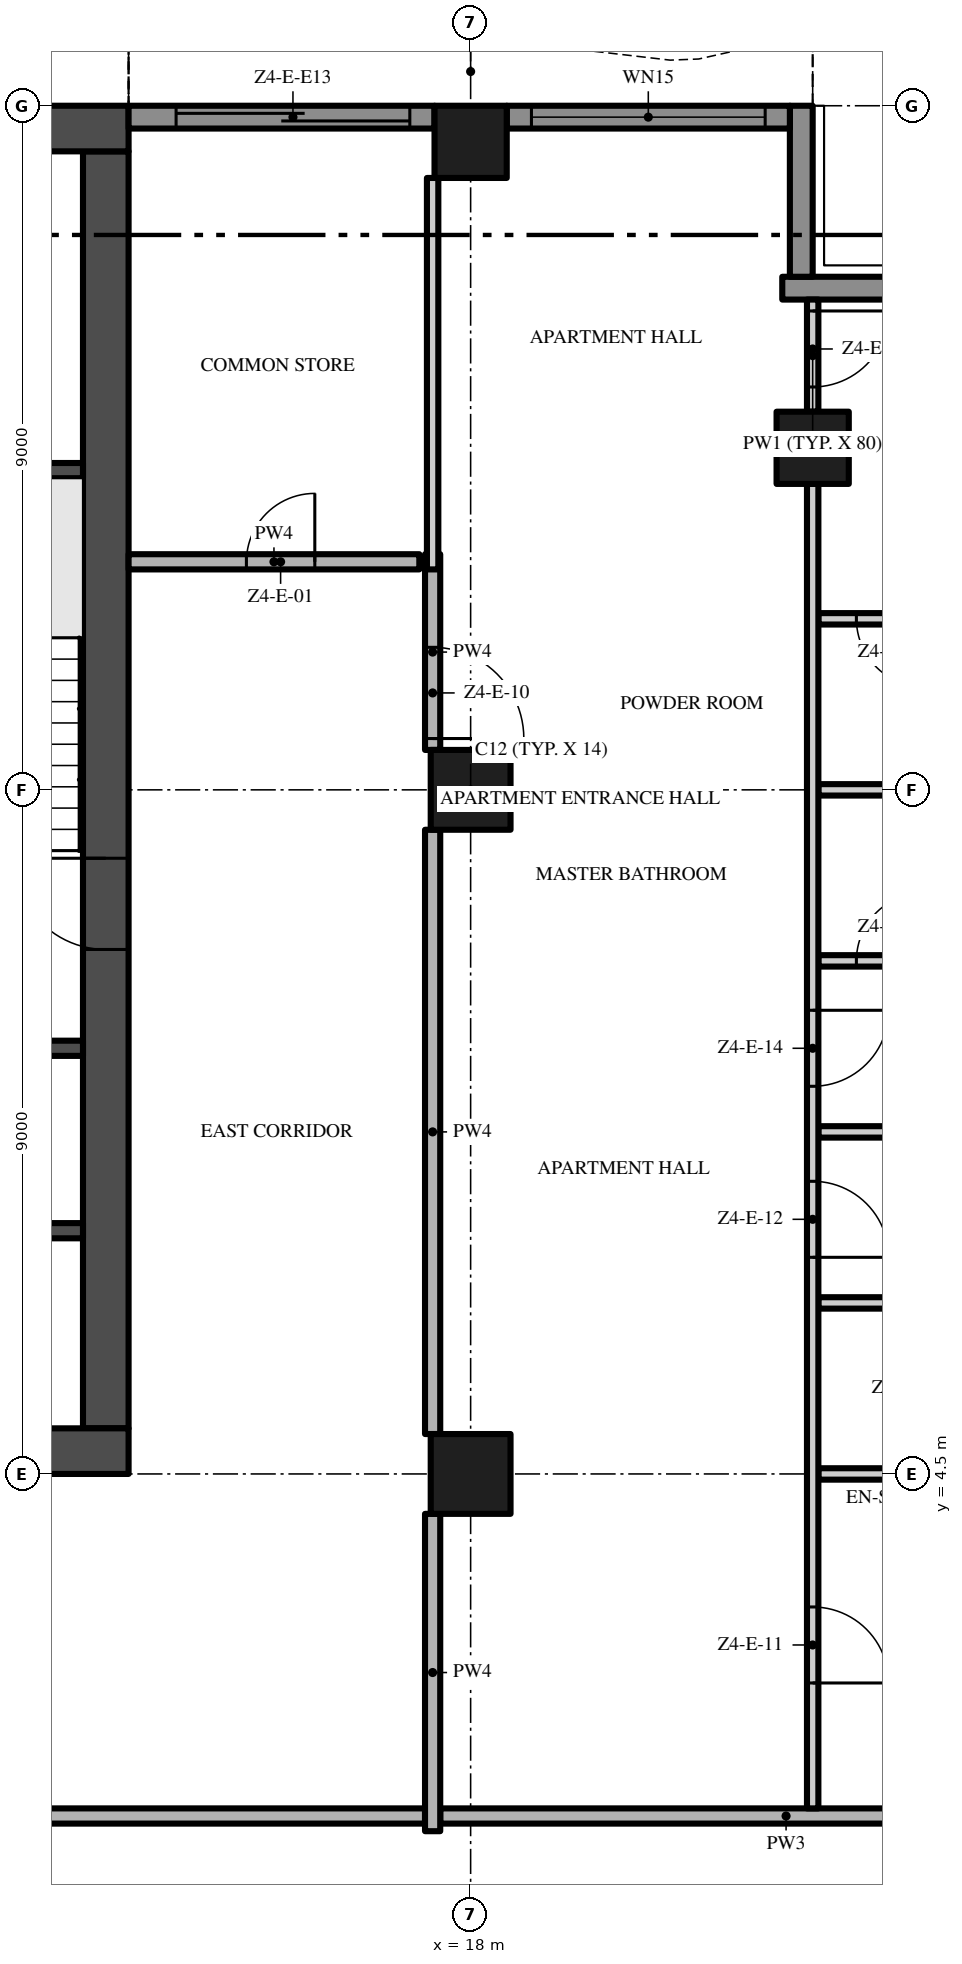
"""IFC4 building model, lengths in metres.
Left out: names, types, materials, properties, quantities, classifications, styles, units other than length and angle.
Written with IfcOpenShell. Run it as: python <this file> out.ifc"""

import sys

from ifc_helpers import new_model, si_unit, direction, frame, frame_2d, origin, origin_2d, place, context, subcontext, project, spatial, polyline, rectangle, outline, extrude, element, fill, save


model = new_model("IFC4")
c1 = context("Model", 3, precision=1e-05, world=origin(), true_north=direction((0.0, 1.0)))
c2 = subcontext(c1, "Body", "Model", "MODEL_VIEW")
j1 = project(units=[si_unit("LENGTHUNIT", "METRE"), si_unit("PLANEANGLEUNIT", "RADIAN")], contexts=[c1])
p1 = place(None, origin())
s1 = spatial("IfcSite", under=j1, at=p1, CompositionType="ELEMENT")
p2 = place(p1, origin())
s2 = spatial("IfcBuilding", under=s1, at=p2, CompositionType="ELEMENT")
p3 = place(p2, frame((0.0, 0.0, 230.0)))
s3 = spatial("IfcBuildingStorey", under=s2, at=p3, CompositionType="ELEMENT", Elevation=230.0)
p4 = place(p3, frame((-13.5, 4.8, -0.3), z_axis=(0.0, 0.0, 1.0), x_axis=(1.0, 0.0, 0.0)))
e1 = element("IfcWall", 1, at=p4, inside=s3, PredefinedType="SHEAR", context=c2, shape_type="SweptSolid", body=[
    extrude(rectangle(XDim=27.0, YDim=0.6, at=frame_2d((13.5, 0.0))), origin(), (0.0, 0.0, 1.0), 3.8),
])
p5 = place(p4, frame((12.0, 0.0, 0.3)))
e2 = element("IfcOpeningElement", 2, at=p5, cuts=e1, PredefinedType="OPENING", context=c2, shape_type="SweptSolid", body=[
    extrude(rectangle(XDim=3.0, YDim=2.4, at=frame_2d((1.5, 1.2))), frame((0.0, 0.31, 0.0), z_axis=(0.0, -1.0, 0.0), x_axis=(1.0, 0.0, 0.0)), (0.0, 0.0, 1.0), 0.62),
])
p6 = place(p4, frame((4.9, 0.0, 0.3)))
e3 = element("IfcOpeningElement", 3, at=p6, cuts=e1, PredefinedType="OPENING", context=c2, shape_type="SweptSolid", body=[
    extrude(rectangle(XDim=1.2, YDim=2.2, at=frame_2d((0.6, 1.1))), frame((0.0, 0.31, 0.0), z_axis=(0.0, -1.0, 0.0), x_axis=(1.0, 0.0, 0.0)), (0.0, 0.0, 1.0), 0.62),
])
p7 = place(p4, frame((20.75, 0.0, 0.3)))
e4 = element("IfcOpeningElement", 4, at=p7, cuts=e1, PredefinedType="OPENING", context=c2, shape_type="SweptSolid", body=[
    extrude(rectangle(XDim=1.5, YDim=2.2, at=frame_2d((0.75, 1.1))), frame((0.0, 0.31, 0.0), z_axis=(0.0, -1.0, 0.0), x_axis=(1.0, 0.0, 0.0)), (0.0, 0.0, 1.0), 0.62),
])
p8 = place(p4, frame((17.4, 0.0, 0.3)))
e5 = element("IfcOpeningElement", 5, at=p8, cuts=e1, PredefinedType="OPENING", context=c2, shape_type="SweptSolid", body=[
    extrude(rectangle(XDim=1.2, YDim=2.2, at=frame_2d((0.6, 1.1))), frame((0.0, 0.31, 0.0), z_axis=(0.0, -1.0, 0.0), x_axis=(1.0, 0.0, 0.0)), (0.0, 0.0, 1.0), 0.62),
])
p9 = place(p3, frame((13.2, 5.1, -0.3), z_axis=(0.0, 0.0, 1.0), x_axis=(0.0, 1.0, 0.0)))
e6 = element("IfcWall", 6, at=p9, inside=s3, PredefinedType="SHEAR", context=c2, shape_type="SweptSolid", body=[
    extrude(rectangle(XDim=16.8, YDim=0.6, at=frame_2d((8.4, 0.0))), origin(), (0.0, 0.0, 1.0), 3.8),
])
p10 = place(p9, frame((6.3, 0.0, 0.3)))
e7 = element("IfcOpeningElement", 7, at=p10, cuts=e6, PredefinedType="OPENING", context=c2, shape_type="SweptSolid", body=[
    extrude(rectangle(XDim=1.2, YDim=2.2, at=frame_2d((0.6, 1.1))), frame((0.0, 0.31, 0.0), z_axis=(0.0, -1.0, 0.0), x_axis=(1.0, 0.0, 0.0)), (0.0, 0.0, 1.0), 0.62),
])
p11 = place(p3, frame((13.5, 22.2, -0.3), z_axis=(0.0, 0.0, 1.0), x_axis=(-1.0, 0.0, 0.0)))
e8 = element("IfcWall", 8, at=p11, inside=s3, PredefinedType="SHEAR", context=c2, shape_type="SweptSolid", body=[
    extrude(rectangle(XDim=27.0, YDim=0.6, at=frame_2d((13.5, 0.0))), origin(), (0.0, 0.0, 1.0), 3.8),
])
p12 = place(p3, frame((18.0, 13.5, 0.0), z_axis=(0.0, 0.0, 1.0), x_axis=(1.0, 0.0, 0.0)))
e9 = element("IfcColumn", 9, at=p12, inside=s3, PredefinedType="COLUMN", context=c2, shape_type="SweptSolid", body=[
    extrude(rectangle(XDim=1.05, YDim=1.05, at=origin_2d()), origin(), (0.0, 0.0, 1.0), 3.5),
])
p13 = place(p3, frame((18.0, 22.025, 0.0), z_axis=(0.0, 0.0, 1.0), x_axis=(1.0, 0.0, 0.0)))
e10 = element("IfcColumn", 10, at=p13, inside=s3, PredefinedType="COLUMN", context=c2, shape_type="SweptSolid", body=[
    extrude(rectangle(XDim=0.95, YDim=0.95, at=origin_2d()), origin(), (0.0, 0.0, 1.0), 3.5),
])
p14 = place(p3, frame((18.0, 4.5, 0.0), z_axis=(0.0, 0.0, 1.0), x_axis=(1.0, 0.0, 0.0)))
e11 = element("IfcColumn", 11, at=p14, inside=s3, PredefinedType="COLUMN", context=c2, shape_type="SweptSolid", body=[
    extrude(rectangle(XDim=1.05, YDim=1.05, at=origin_2d()), origin(), (0.0, 0.0, 1.0), 3.5),
])
p15 = place(p3, frame((22.5, 18.0, 0.0), z_axis=(0.0, 0.0, 1.0), x_axis=(1.0, 0.0, 0.0)))
e12 = element("IfcColumn", 12, at=p15, inside=s3, PredefinedType="COLUMN", context=c2, shape_type="SweptSolid", body=[
    extrude(rectangle(XDim=0.95, YDim=0.95, at=origin_2d()), origin(), (0.0, 0.0, 1.0), 3.5),
])
p16 = place(p3, frame((22.1, 20.1, 0.0), z_axis=(0.0, 0.0, 1.0), x_axis=(1.0, 0.0, 0.0)))
e13 = element("IfcWall", 13, at=p16, inside=s3, PredefinedType="SOLIDWALL", context=c2, shape_type="SweptSolid", body=[
    extrude(rectangle(XDim=2.35, YDim=0.3, at=frame_2d((1.175, 0.0))), origin(), (0.0, 0.0, 1.0), 3.5),
])
p17 = place(p3, frame((22.35, 22.5, 0.0), z_axis=(0.0, 0.0, 1.0), x_axis=(0.0, -1.0, 0.0)))
e14 = element("IfcWall", 14, at=p17, inside=s3, PredefinedType="SOLIDWALL", context=c2, shape_type="SweptSolid", body=[
    extrude(rectangle(XDim=2.25, YDim=0.3, at=frame_2d((1.125, 0.0))), origin(), (0.0, 0.0, 1.0), 3.5),
])
p18 = place(p3, frame((18.475, 22.35, 0.0), z_axis=(0.0, 0.0, 1.0), x_axis=(1.0, 0.0, 0.0)))
e15 = element("IfcWall", 15, at=p18, inside=s3, PredefinedType="SOLIDWALL", context=c2, shape_type="SweptSolid", body=[
    extrude(rectangle(XDim=3.725, YDim=0.3, at=frame_2d((1.863, 0.0))), origin(), (0.0, 0.0, 1.0), 3.5),
])
p19 = place(p18, frame((0.325, 0.0, 0.45)))
e16 = element("IfcOpeningElement", 16, at=p19, cuts=e15, PredefinedType="OPENING", context=c2, shape_type="SweptSolid", body=[
    extrude(rectangle(XDim=3.075, YDim=2.65, at=frame_2d((1.538, 1.325))), frame((0.0, 0.16, 0.0), z_axis=(0.0, -1.0, 0.0), x_axis=(1.0, 0.0, 0.0)), (0.0, 0.0, 1.0), 0.32),
])
p20 = place(p3, frame((13.5, 22.35, 0.0), z_axis=(0.0, 0.0, 1.0), x_axis=(1.0, 0.0, 0.0)))
e17 = element("IfcWall", 17, at=p20, inside=s3, PredefinedType="SOLIDWALL", context=c2, shape_type="SweptSolid", body=[
    extrude(rectangle(XDim=4.025, YDim=0.3, at=frame_2d((2.013, 0.0))), origin(), (0.0, 0.0, 1.0), 3.5),
])
p21 = place(p20, frame((0.625, 0.0, 0.0)))
e18 = element("IfcOpeningElement", 18, at=p21, cuts=e17, PredefinedType="OPENING", context=c2, shape_type="SweptSolid", body=[
    extrude(rectangle(XDim=3.075, YDim=2.4, at=frame_2d((1.538, 1.2))), frame((0.0, 0.16, 0.0), z_axis=(0.0, -1.0, 0.0), x_axis=(1.0, 0.0, 0.0)), (0.0, 0.0, 1.0), 0.32),
])
p22 = place(p3, origin())
e19 = element("IfcWall", 19, at=p22, inside=s3, PredefinedType="USERDEFINED", context=c2, shape_type="SweptSolid", body=[
    extrude(outline(polyline([(22.5, 23.451), (21.0, 23.115), (20.625, 23.1), (19.5, 23.231), (18.0, 23.755), (16.5, 24.488), (15.0, 25.149), (13.5, 25.485), (13.445, 25.241), (14.921, 24.91), (16.395, 24.261), (17.904, 23.524), (19.444, 22.986), (20.615, 22.849), (21.033, 22.866), (22.555, 23.208), (22.5, 23.451)])), origin(), (0.0, 0.0, 1.0), 0.9),
])
for number, where, z_axis, x_axis in (
    (20, (9.65, 7.7, 0.0), (0.0, 0.0, 1.0), (1.0, 0.0, 0.0)),
    (21, (9.65, 10.1, 0.0), (0.0, 0.0, 1.0), (1.0, 0.0, 0.0)),
    (22, (9.65, 17.7, 0.0), (0.0, 0.0, 1.0), (1.0, 0.0, 0.0)),
):
    element("IfcWall", number, at=place(p3, frame(where, z_axis=z_axis, x_axis=x_axis)), inside=s3, PredefinedType="SHEAR", context=c2, shape_type="SweptSolid", body=[
        extrude(rectangle(XDim=3.25, YDim=0.2, at=frame_2d((1.625, 0.0))), origin(), (0.0, 0.0, 1.0), 3.5),
    ])
p23 = place(p3, frame((17.4, 0.0, 0.0), z_axis=(0.0, 0.0, 1.0), x_axis=(-1.0, 0.0, 0.0)))
e23 = element("IfcWall", 23, at=p23, inside=s3, PredefinedType="PARTITIONING", context=c2, shape_type="SweptSolid", body=[
    extrude(rectangle(XDim=17.3, YDim=0.2, at=frame_2d((8.65, 0.0))), origin(), (0.0, 0.0, 1.0), 3.5),
])
p24 = place(p23, frame((7.65, 0.0, 0.0)))
e24 = element("IfcOpeningElement", 24, at=p24, cuts=e23, PredefinedType="OPENING", context=c2, shape_type="SweptSolid", body=[
    extrude(rectangle(XDim=1.5, YDim=2.4, at=frame_2d((0.75, 1.2))), frame((0.0, 0.11, 0.0), z_axis=(0.0, -1.0, 0.0), x_axis=(1.0, 0.0, 0.0)), (0.0, 0.0, 1.0), 0.22),
])
p25 = place(p3, frame((17.6, 0.0, 0.0), z_axis=(0.0, 0.0, 1.0), x_axis=(1.0, 0.0, 0.0)))
e25 = element("IfcWall", 25, at=p25, inside=s3, PredefinedType="PARTITIONING", context=c2, shape_type="SweptSolid", body=[
    extrude(rectangle(XDim=9.1, YDim=0.2, at=frame_2d((4.55, 0.0))), origin(), (0.0, 0.0, 1.0), 3.5),
])
p26 = place(p3, frame((22.575, 4.5, 0.0), z_axis=(0.0, 0.0, 1.0), x_axis=(1.0, 0.0, 0.0)))
e26 = element("IfcWall", 26, at=p26, inside=s3, PredefinedType="PARTITIONING", context=c2, shape_type="SweptSolid", body=[
    extrude(rectangle(XDim=3.475, YDim=0.15, at=frame_2d((1.738, 0.0))), origin(), (0.0, 0.0, 1.0), 3.5),
])
p27 = place(p3, frame((22.575, 6.75, 0.0), z_axis=(0.0, 0.0, 1.0), x_axis=(1.0, 0.0, 0.0)))
e27 = element("IfcWall", 27, at=p27, inside=s3, PredefinedType="PARTITIONING", context=c2, shape_type="SweptSolid", body=[
    extrude(rectangle(XDim=1.875, YDim=0.15, at=frame_2d((0.938, 0.0))), origin(), (0.0, 0.0, 1.0), 3.5),
])
p28 = place(p3, frame((22.575, 9.0, 0.0), z_axis=(0.0, 0.0, 1.0), x_axis=(1.0, 0.0, 0.0)))
e28 = element("IfcWall", 28, at=p28, inside=s3, PredefinedType="PARTITIONING", context=c2, shape_type="SweptSolid", body=[
    extrude(rectangle(XDim=4.125, YDim=0.15, at=frame_2d((2.062, 0.0))), origin(), (0.0, 0.0, 1.0), 3.5),
])
p29 = place(p3, frame((22.575, 11.25, 0.0), z_axis=(0.0, 0.0, 1.0), x_axis=(1.0, 0.0, 0.0)))
e29 = element("IfcWall", 29, at=p29, inside=s3, PredefinedType="PARTITIONING", context=c2, shape_type="SweptSolid", body=[
    extrude(rectangle(XDim=1.875, YDim=0.15, at=frame_2d((0.938, 0.0))), origin(), (0.0, 0.0, 1.0), 3.5),
])
p30 = place(p29, frame((0.5, 0.0, 0.0)))
e30 = element("IfcOpeningElement", 30, at=p30, cuts=e29, PredefinedType="OPENING", context=c2, shape_type="SweptSolid", body=[
    extrude(rectangle(XDim=0.9, YDim=2.1, at=frame_2d((0.45, 1.05))), frame((0.0, 0.085, 0.0), z_axis=(0.0, -1.0, 0.0), x_axis=(1.0, 0.0, 0.0)), (0.0, 0.0, 1.0), 0.17),
])
p31 = place(p3, frame((22.575, 13.5, 0.0), z_axis=(0.0, 0.0, 1.0), x_axis=(1.0, 0.0, 0.0)))
e31 = element("IfcWall", 31, at=p31, inside=s3, PredefinedType="PARTITIONING", context=c2, shape_type="SweptSolid", body=[
    extrude(rectangle(XDim=1.875, YDim=0.15, at=frame_2d((0.938, 0.0))), origin(), (0.0, 0.0, 1.0), 3.5),
])
p32 = place(p3, frame((24.45, 15.75, 0.0), z_axis=(0.0, 0.0, 1.0), x_axis=(-1.0, 0.0, 0.0)))
e32 = element("IfcWall", 32, at=p32, inside=s3, PredefinedType="PARTITIONING", context=c2, shape_type="SweptSolid", body=[
    extrude(rectangle(XDim=1.875, YDim=0.15, at=frame_2d((0.938, 0.0))), origin(), (0.0, 0.0, 1.0), 3.5),
])
p33 = place(p32, frame((0.475, 0.0, 0.0)))
e33 = element("IfcOpeningElement", 33, at=p33, cuts=e32, PredefinedType="OPENING", context=c2, shape_type="SweptSolid", body=[
    extrude(rectangle(XDim=0.9, YDim=2.1, at=frame_2d((0.45, 1.05))), frame((0.0, 0.085, 0.0), z_axis=(0.0, -1.0, 0.0), x_axis=(1.0, 0.0, 0.0)), (0.0, 0.0, 1.0), 0.17),
])
p34 = place(p3, frame((13.5, 16.5, 0.0), z_axis=(0.0, 0.0, 1.0), x_axis=(1.0, 0.0, 0.0)))
e34 = element("IfcWall", 34, at=p34, inside=s3, PredefinedType="PARTITIONING", context=c2, shape_type="SweptSolid", body=[
    extrude(rectangle(XDim=3.825, YDim=0.2, at=frame_2d((1.913, 0.0))), origin(), (0.0, 0.0, 1.0), 3.5),
])
p35 = place(p34, frame((1.55, 0.0, 0.0)))
e35 = element("IfcOpeningElement", 35, at=p35, cuts=e34, PredefinedType="OPENING", context=c2, shape_type="SweptSolid", body=[
    extrude(rectangle(XDim=0.9, YDim=2.1, at=frame_2d((0.45, 1.05))), frame((0.0, 0.11, 0.0), z_axis=(0.0, -1.0, 0.0), x_axis=(1.0, 0.0, 0.0)), (0.0, 0.0, 1.0), 0.22),
])
p36 = place(p3, frame((17.5, -0.2, 0.0), z_axis=(0.0, 0.0, 1.0), x_axis=(0.0, 1.0, 0.0)))
e36 = element("IfcWall", 36, at=p36, inside=s3, PredefinedType="PARTITIONING", context=c2, shape_type="SweptSolid", body=[
    extrude(rectangle(XDim=4.175, YDim=0.2, at=frame_2d((2.087, 0.0))), origin(), (0.0, 0.0, 1.0), 3.5),
])
p37 = place(p3, frame((17.5, 5.025, 0.0), z_axis=(0.0, 0.0, 1.0), x_axis=(0.0, 1.0, 0.0)))
e37 = element("IfcWall", 37, at=p37, inside=s3, PredefinedType="PARTITIONING", context=c2, shape_type="SweptSolid", body=[
    extrude(rectangle(XDim=7.95, YDim=0.2, at=frame_2d((3.975, 0.0))), origin(), (0.0, 0.0, 1.0), 3.5),
])
p38 = place(p3, frame((17.5, 16.6, 0.0), z_axis=(0.0, 0.0, 1.0), x_axis=(0.0, -1.0, 0.0)))
e38 = element("IfcWall", 38, at=p38, inside=s3, PredefinedType="PARTITIONING", context=c2, shape_type="SweptSolid", body=[
    extrude(rectangle(XDim=2.575, YDim=0.2, at=frame_2d((1.288, 0.0))), origin(), (0.0, 0.0, 1.0), 3.5),
])
p39 = place(p38, frame((1.225, 0.0, 0.0)))
e39 = element("IfcOpeningElement", 39, at=p39, cuts=e38, PredefinedType="OPENING", context=c2, shape_type="SweptSolid", body=[
    extrude(rectangle(XDim=1.2, YDim=2.4, at=frame_2d((0.6, 1.2))), frame((0.0, 0.11, 0.0), z_axis=(0.0, -1.0, 0.0), x_axis=(1.0, 0.0, 0.0)), (0.0, 0.0, 1.0), 0.22),
])
p40 = place(p3, frame((17.5, 16.4, 0.0), z_axis=(0.0, 0.0, 1.0), x_axis=(0.0, 1.0, 0.0)))
e40 = element("IfcWall", 40, at=p40, inside=s3, PredefinedType="PARTITIONING", context=c2, shape_type="SweptSolid", body=[
    extrude(rectangle(XDim=5.15, YDim=0.15, at=frame_2d((2.575, 0.0))), origin(), (0.0, 0.0, 1.0), 3.5),
])
p41 = place(p3, frame((22.5, 17.525, 0.0), z_axis=(0.0, 0.0, 1.0), x_axis=(0.0, -1.0, 0.0)))
e41 = element("IfcWall", 41, at=p41, inside=s3, PredefinedType="PARTITIONING", context=c2, shape_type="SweptSolid", body=[
    extrude(rectangle(XDim=17.425, YDim=0.15, at=frame_2d((8.713, 0.0))), origin(), (0.0, 0.0, 1.0), 3.5),
])
p42 = place(p41, frame((14.775, 0.0, 0.0)))
e42 = element("IfcOpeningElement", 42, at=p42, cuts=e41, PredefinedType="OPENING", context=c2, shape_type="SweptSolid", body=[
    extrude(rectangle(XDim=1.0, YDim=2.4, at=frame_2d((0.5, 1.2))), frame((0.0, 0.085, 0.0), z_axis=(0.0, -1.0, 0.0), x_axis=(1.0, 0.0, 0.0)), (0.0, 0.0, 1.0), 0.17),
])
p43 = place(p41, frame((9.175, 0.0, 0.0)))
e43 = element("IfcOpeningElement", 43, at=p43, cuts=e41, PredefinedType="OPENING", context=c2, shape_type="SweptSolid", body=[
    extrude(rectangle(XDim=1.0, YDim=2.4, at=frame_2d((0.5, 1.2))), frame((0.0, 0.085, 0.0), z_axis=(0.0, -1.0, 0.0), x_axis=(1.0, 0.0, 0.0)), (0.0, 0.0, 1.0), 0.17),
])
p44 = place(p41, frame((6.925, 0.0, 0.0)))
e44 = element("IfcOpeningElement", 44, at=p44, cuts=e41, PredefinedType="OPENING", context=c2, shape_type="SweptSolid", body=[
    extrude(rectangle(XDim=1.0, YDim=2.4, at=frame_2d((0.5, 1.2))), frame((0.0, 0.085, 0.0), z_axis=(0.0, -1.0, 0.0), x_axis=(1.0, 0.0, 0.0)), (0.0, 0.0, 1.0), 0.17),
])
p45 = place(p3, frame((22.5, 19.95, 0.0), z_axis=(0.0, 0.0, 1.0), x_axis=(0.0, -1.0, 0.0)))
e45 = element("IfcWall", 45, at=p45, inside=s3, PredefinedType="PARTITIONING", context=c2, shape_type="SweptSolid", body=[
    extrude(rectangle(XDim=1.475, YDim=0.15, at=frame_2d((0.738, 0.0))), origin(), (0.0, 0.0, 1.0), 3.5),
])
p46 = place(p45, frame((0.15, 0.0, 0.0)))
e46 = element("IfcOpeningElement", 46, at=p46, cuts=e45, PredefinedType="OPENING", context=c2, shape_type="SweptSolid", body=[
    extrude(rectangle(XDim=1.0, YDim=2.4, at=frame_2d((0.5, 1.2))), frame((0.0, 0.085, 0.0), z_axis=(0.0, -1.0, 0.0), x_axis=(1.0, 0.0, 0.0)), (0.0, 0.0, 1.0), 0.17),
])
p47 = place(p19, origin())
e47 = element("IfcWindow", 47, at=p47, inside=s3, PartitioningType="SINGLE_PANEL", PredefinedType="WINDOW", context=c2, shape_type="SweptSolid", body=[
    extrude(rectangle(XDim=3.075, YDim=2.65, at=frame_2d((1.538, 1.325))), frame((0.0, 0.03, 0.0), z_axis=(0.0, -1.0, 0.0), x_axis=(1.0, 0.0, 0.0)), (0.0, 0.0, 1.0), 0.06),
])
fill(e16, e47)
p48 = place(p21, origin())
e48 = element("IfcDoor", 48, at=p48, inside=s3, OperationType="SINGLE_SWING_LEFT", PredefinedType="DOOR", context=c2, shape_type="SweptSolid", body=[
    extrude(rectangle(XDim=3.075, YDim=2.4, at=frame_2d((1.538, 1.2))), frame((0.0, 0.025, 0.0), z_axis=(0.0, -1.0, 0.0), x_axis=(1.0, 0.0, 0.0)), (0.0, 0.0, 1.0), 0.05),
])
fill(e18, e48)
p49 = place(p10, frame((1.2, 0.0, 0.0), z_axis=(0.0, 0.0, 1.0), x_axis=(-1.0, 0.0, 0.0)))
e49 = element("IfcDoor", 49, at=p49, inside=s3, OperationType="SINGLE_SWING_LEFT", PredefinedType="DOOR", context=c2, shape_type="SweptSolid", body=[
    extrude(rectangle(XDim=1.2, YDim=2.2, at=frame_2d((0.6, 1.1))), frame((0.0, 0.025, 0.0), z_axis=(0.0, -1.0, 0.0), x_axis=(1.0, 0.0, 0.0)), (0.0, 0.0, 1.0), 0.05),
])
fill(e7, e49)
p50 = place(p35, origin())
e50 = element("IfcDoor", 50, at=p50, inside=s3, OperationType="SINGLE_SWING_RIGHT", PredefinedType="DOOR", context=c2, shape_type="SweptSolid", body=[
    extrude(rectangle(XDim=0.9, YDim=2.1, at=frame_2d((0.45, 1.05))), frame((0.0, 0.025, 0.0), z_axis=(0.0, -1.0, 0.0), x_axis=(1.0, 0.0, 0.0)), (0.0, 0.0, 1.0), 0.05),
])
fill(e35, e50)
p51 = place(p39, origin())
e51 = element("IfcDoor", 51, at=p51, inside=s3, OperationType="SINGLE_SWING_RIGHT", PredefinedType="DOOR", context=c2, shape_type="SweptSolid", body=[
    extrude(rectangle(XDim=1.2, YDim=2.4, at=frame_2d((0.6, 1.2))), frame((0.0, 0.025, 0.0), z_axis=(0.0, -1.0, 0.0), x_axis=(1.0, 0.0, 0.0)), (0.0, 0.0, 1.0), 0.05),
])
fill(e39, e51)
p52 = place(p42, origin())
e52 = element("IfcDoor", 52, at=p52, inside=s3, OperationType="SINGLE_SWING_RIGHT", PredefinedType="DOOR", context=c2, shape_type="SweptSolid", body=[
    extrude(rectangle(XDim=1.0, YDim=2.4, at=frame_2d((0.5, 1.2))), frame((0.0, 0.025, 0.0), z_axis=(0.0, -1.0, 0.0), x_axis=(1.0, 0.0, 0.0)), (0.0, 0.0, 1.0), 0.05),
])
fill(e42, e52)
p53 = place(p43, origin())
e53 = element("IfcDoor", 53, at=p53, inside=s3, OperationType="SINGLE_SWING_RIGHT", PredefinedType="DOOR", context=c2, shape_type="SweptSolid", body=[
    extrude(rectangle(XDim=1.0, YDim=2.4, at=frame_2d((0.5, 1.2))), frame((0.0, 0.025, 0.0), z_axis=(0.0, -1.0, 0.0), x_axis=(1.0, 0.0, 0.0)), (0.0, 0.0, 1.0), 0.05),
])
fill(e43, e53)
p54 = place(p44, origin())
e54 = element("IfcDoor", 54, at=p54, inside=s3, OperationType="SINGLE_SWING_LEFT", PredefinedType="DOOR", context=c2, shape_type="SweptSolid", body=[
    extrude(rectangle(XDim=1.0, YDim=2.4, at=frame_2d((0.5, 1.2))), frame((0.0, 0.025, 0.0), z_axis=(0.0, -1.0, 0.0), x_axis=(1.0, 0.0, 0.0)), (0.0, 0.0, 1.0), 0.05),
])
fill(e44, e54)
p55 = place(p30, origin())
e55 = element("IfcDoor", 55, at=p55, inside=s3, OperationType="SINGLE_SWING_RIGHT", PredefinedType="DOOR", context=c2, shape_type="SweptSolid", body=[
    extrude(rectangle(XDim=0.9, YDim=2.1, at=frame_2d((0.45, 1.05))), frame((0.0, 0.025, 0.0), z_axis=(0.0, -1.0, 0.0), x_axis=(1.0, 0.0, 0.0)), (0.0, 0.0, 1.0), 0.05),
])
fill(e30, e55)
p56 = place(p46, origin())
e56 = element("IfcDoor", 56, at=p56, inside=s3, OperationType="SINGLE_SWING_LEFT", PredefinedType="DOOR", context=c2, shape_type="SweptSolid", body=[
    extrude(rectangle(XDim=1.0, YDim=2.4, at=frame_2d((0.5, 1.2))), frame((0.0, 0.025, 0.0), z_axis=(0.0, -1.0, 0.0), x_axis=(1.0, 0.0, 0.0)), (0.0, 0.0, 1.0), 0.05),
])
fill(e46, e56)
p57 = place(p33, origin())
e57 = element("IfcDoor", 57, at=p57, inside=s3, OperationType="SINGLE_SWING_LEFT", PredefinedType="DOOR", context=c2, shape_type="SweptSolid", body=[
    extrude(rectangle(XDim=0.9, YDim=2.1, at=frame_2d((0.45, 1.05))), frame((0.0, 0.025, 0.0), z_axis=(0.0, -1.0, 0.0), x_axis=(1.0, 0.0, 0.0)), (0.0, 0.0, 1.0), 0.05),
])
fill(e33, e57)
save(model, sys.argv[1])
